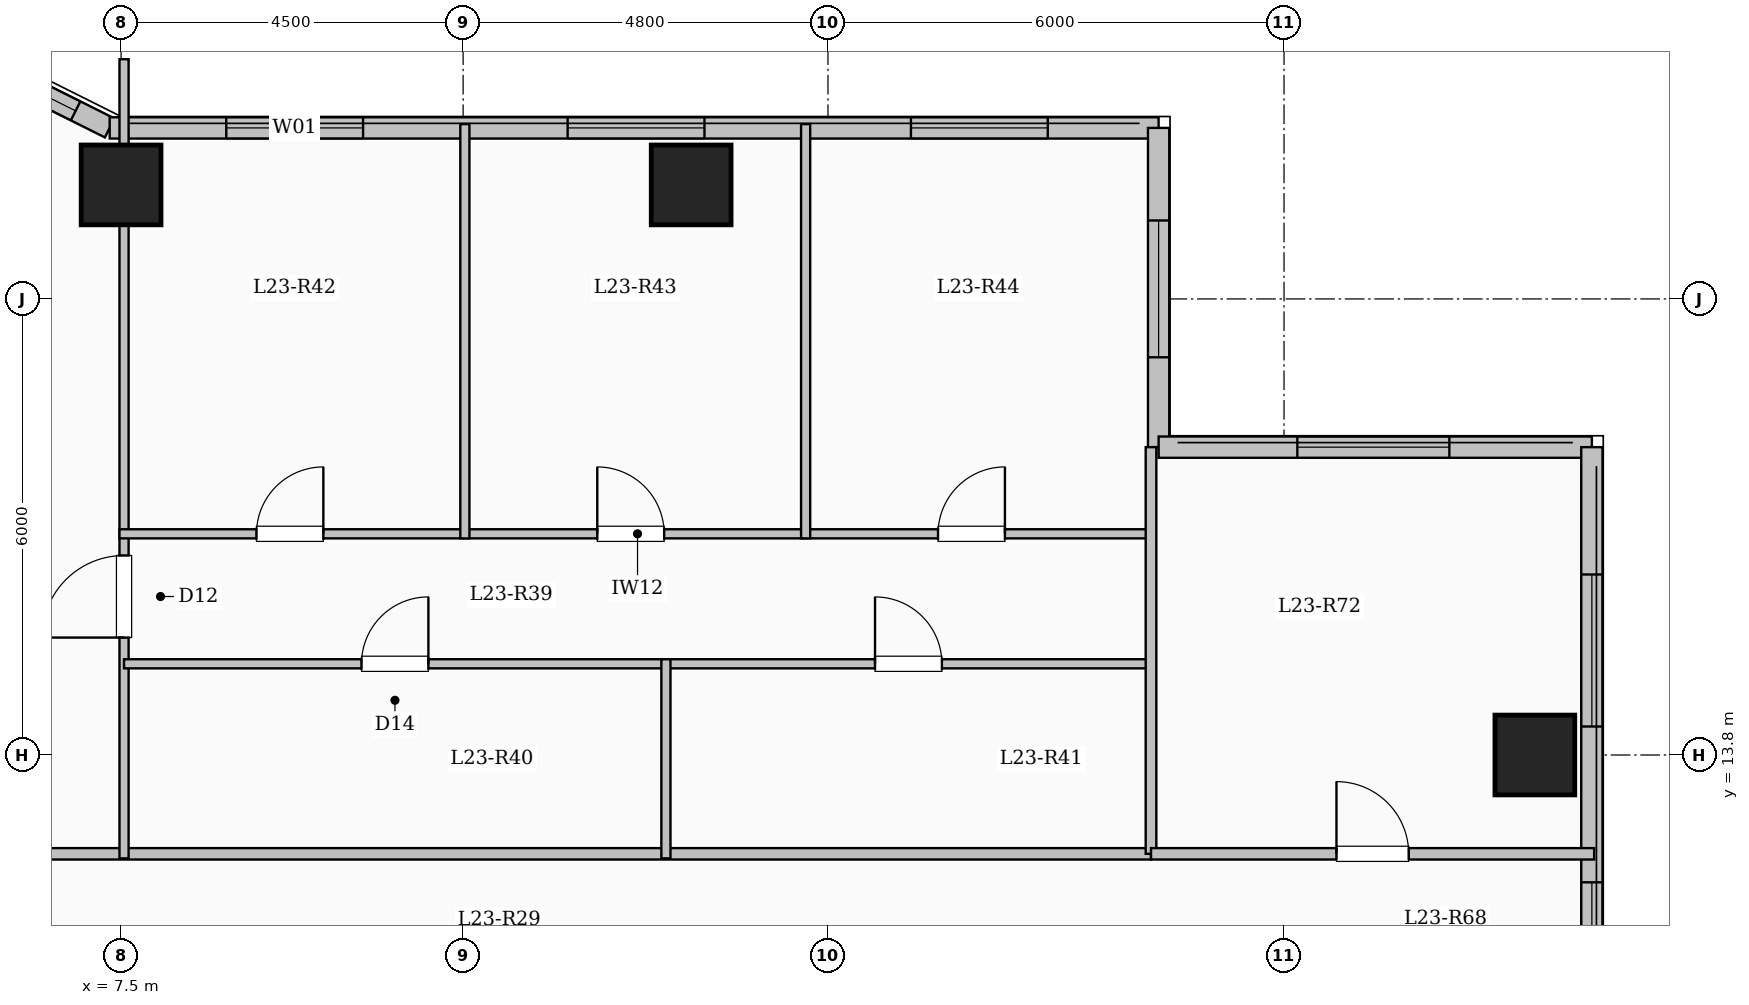
"""IFC4 building model, lengths in metres.
Left out: names, types, materials, properties, quantities, classifications, styles, units other than length and angle.
Written with IfcOpenShell. Run it as: python <this file> out.ifc"""

import sys

from ifc_helpers import new_model, si_unit, direction, frame, frame_2d, origin, origin_2d, place, context, subcontext, project, spatial, rectangle, extrude, element, fill, save


model = new_model("IFC4")
c1 = context("Model", 3, precision=1e-05, world=origin(), true_north=direction((0.0, 1.0)))
c2 = subcontext(c1, "Body", "Model", "MODEL_VIEW")
j1 = project(units=[si_unit("LENGTHUNIT", "METRE"), si_unit("PLANEANGLEUNIT", "RADIAN")], contexts=[c1])
p1 = place(None, origin())
s1 = spatial("IfcSite", under=j1, at=p1, CompositionType="ELEMENT")
p2 = place(p1, origin())
s2 = spatial("IfcBuilding", under=s1, at=p2, CompositionType="ELEMENT")
p3 = place(p2, frame((0.0, 0.0, 88.35)))
s3 = spatial("IfcBuildingStorey", under=s2, at=p3, CompositionType="ELEMENT", Elevation=88.35)
for number, where, z_axis, x_axis in (
    (1, (7.5, 21.3, 0.0), (0.0, 0.0, 1.0), (1.0, 0.0, 0.0)),
    (2, (15.0, 21.3, 0.0), (0.0, 0.0, 1.0), (1.0, 0.0, 0.0)),
    (3, (26.1, 13.8, 0.0), (0.0, 0.0, 1.0), (1.0, 0.0, 0.0)),
):
    element("IfcColumn", number, at=place(p3, frame(where, z_axis=z_axis, x_axis=x_axis)), inside=s3, PredefinedType="COLUMN", context=c2, shape_type="SweptSolid", body=[
        extrude(rectangle(XDim=1.05, YDim=1.05, at=origin_2d()), origin(), (0.0, 0.0, 1.0), 3.35),
    ])
p4 = place(p3, frame((4.35, 23.55, 0.0), z_axis=(0.0, 0.0, 1.0), x_axis=(0.894427191, -0.4472135955, 0.0)))
e4 = element("IfcWall", 4, at=p4, inside=s3, PredefinedType="SOLIDWALL", context=c2, shape_type="SweptSolid", body=[
    extrude(rectangle(XDim=3.354, YDim=0.28, at=frame_2d((1.677, 0.0))), origin(), (0.0, 0.0, 1.0), 3.1),
])
p5 = place(p4, frame((1.653, 0.0, 0.95)))
e5 = element("IfcOpeningElement", 5, at=p5, cuts=e4, PredefinedType="OPENING", context=c2, shape_type="SweptSolid", body=[
    extrude(rectangle(XDim=1.2, YDim=1.5, at=frame_2d((0.6, 0.75))), frame((0.0, 0.15, 0.0), z_axis=(0.0, -1.0, 0.0), x_axis=(1.0, 0.0, 0.0)), (0.0, 0.0, 1.0), 0.3),
])
p6 = place(p3, frame((7.35, 22.05, 0.0), z_axis=(0.0, 0.0, 1.0), x_axis=(1.0, 0.0, 0.0)))
e6 = element("IfcWall", 6, at=p6, inside=s3, PredefinedType="SOLIDWALL", context=c2, shape_type="SweptSolid", body=[
    extrude(rectangle(XDim=13.8, YDim=0.28, at=frame_2d((6.9, 0.0))), origin(), (0.0, 0.0, 1.0), 3.1),
])
p7 = place(p6, frame((1.534, 0.0, 0.9)))
e7 = element("IfcOpeningElement", 7, at=p7, cuts=e6, PredefinedType="OPENING", context=c2, shape_type="SweptSolid", body=[
    extrude(rectangle(XDim=1.8, YDim=1.65, at=frame_2d((0.9, 0.825))), frame((0.0, 0.15, 0.0), z_axis=(0.0, -1.0, 0.0), x_axis=(1.0, 0.0, 0.0)), (0.0, 0.0, 1.0), 0.3),
])
p8 = place(p6, frame((6.025, 0.0, 0.9)))
e8 = element("IfcOpeningElement", 8, at=p8, cuts=e6, PredefinedType="OPENING", context=c2, shape_type="SweptSolid", body=[
    extrude(rectangle(XDim=1.8, YDim=1.65, at=frame_2d((0.9, 0.825))), frame((0.0, 0.15, 0.0), z_axis=(0.0, -1.0, 0.0), x_axis=(1.0, 0.0, 0.0)), (0.0, 0.0, 1.0), 0.3),
])
p9 = place(p6, frame((10.542, 0.0, 0.9)))
e9 = element("IfcOpeningElement", 9, at=p9, cuts=e6, PredefinedType="OPENING", context=c2, shape_type="SweptSolid", body=[
    extrude(rectangle(XDim=1.8, YDim=1.65, at=frame_2d((0.9, 0.825))), frame((0.0, 0.15, 0.0), z_axis=(0.0, -1.0, 0.0), x_axis=(1.0, 0.0, 0.0)), (0.0, 0.0, 1.0), 0.3),
])
p10 = place(p3, frame((21.15, 22.05, 0.0), z_axis=(0.0, 0.0, 1.0), x_axis=(0.0, -1.0, 0.0)))
e10 = element("IfcWall", 10, at=p10, inside=s3, PredefinedType="SOLIDWALL", context=c2, shape_type="SweptSolid", body=[
    extrude(rectangle(XDim=4.2, YDim=0.28, at=frame_2d((2.1, 0.0))), origin(), (0.0, 0.0, 1.0), 3.1),
])
p11 = place(p10, frame((1.218, 0.0, 0.9)))
e11 = element("IfcOpeningElement", 11, at=p11, cuts=e10, PredefinedType="OPENING", context=c2, shape_type="SweptSolid", body=[
    extrude(rectangle(XDim=1.8, YDim=1.65, at=frame_2d((0.9, 0.825))), frame((0.0, 0.15, 0.0), z_axis=(0.0, -1.0, 0.0), x_axis=(1.0, 0.0, 0.0)), (0.0, 0.0, 1.0), 0.3),
])
p12 = place(p3, frame((21.15, 17.85, 0.0), z_axis=(0.0, 0.0, 1.0), x_axis=(1.0, 0.0, 0.0)))
e12 = element("IfcWall", 12, at=p12, inside=s3, PredefinedType="SOLIDWALL", context=c2, shape_type="SweptSolid", body=[
    extrude(rectangle(XDim=5.7, YDim=0.28, at=frame_2d((2.85, 0.0))), origin(), (0.0, 0.0, 1.0), 3.1),
])
p13 = place(p12, frame((1.825, 0.0, 0.9)))
e13 = element("IfcOpeningElement", 13, at=p13, cuts=e12, PredefinedType="OPENING", context=c2, shape_type="SweptSolid", body=[
    extrude(rectangle(XDim=2.0, YDim=1.7, at=frame_2d((1.0, 0.85))), frame((0.0, 0.15, 0.0), z_axis=(0.0, -1.0, 0.0), x_axis=(1.0, 0.0, 0.0)), (0.0, 0.0, 1.0), 0.3),
])
p14 = place(p3, frame((26.85, 17.85, 0.0), z_axis=(0.0, 0.0, 1.0), x_axis=(0.0, -1.0, 0.0)))
e14 = element("IfcWall", 14, at=p14, inside=s3, PredefinedType="SOLIDWALL", context=c2, shape_type="SweptSolid", body=[
    extrude(rectangle(XDim=35.7, YDim=0.28, at=frame_2d((17.85, 0.0))), origin(), (0.0, 0.0, 1.0), 3.1),
])
p15 = place(p14, frame((1.675, 0.0, 0.9)))
e15 = element("IfcOpeningElement", 15, at=p15, cuts=e14, PredefinedType="OPENING", context=c2, shape_type="SweptSolid", body=[
    extrude(rectangle(XDim=2.0, YDim=1.7, at=frame_2d((1.0, 0.85))), frame((0.0, 0.15, 0.0), z_axis=(0.0, -1.0, 0.0), x_axis=(1.0, 0.0, 0.0)), (0.0, 0.0, 1.0), 0.3),
])
p16 = place(p14, frame((5.725, 0.0, 0.95)))
e16 = element("IfcOpeningElement", 16, at=p16, cuts=e14, PredefinedType="OPENING", context=c2, shape_type="SweptSolid", body=[
    extrude(rectangle(XDim=1.0, YDim=1.5, at=frame_2d((0.5, 0.75))), frame((0.0, 0.15, 0.0), z_axis=(0.0, -1.0, 0.0), x_axis=(1.0, 0.0, 0.0)), (0.0, 0.0, 1.0), 0.3),
])
p17 = place(p14, frame((15.1, 0.0, 0.9)))
e17 = element("IfcOpeningElement", 17, at=p17, cuts=e14, PredefinedType="OPENING", context=c2, shape_type="SweptSolid", body=[
    extrude(rectangle(XDim=2.0, YDim=1.7, at=frame_2d((1.0, 0.85))), frame((0.0, 0.15, 0.0), z_axis=(0.0, -1.0, 0.0), x_axis=(1.0, 0.0, 0.0)), (0.0, 0.0, 1.0), 0.3),
])
p18 = place(p14, frame((25.857, 0.0, 0.9)))
e18 = element("IfcOpeningElement", 18, at=p18, cuts=e14, PredefinedType="OPENING", context=c2, shape_type="SweptSolid", body=[
    extrude(rectangle(XDim=1.5, YDim=1.65, at=frame_2d((0.75, 0.825))), frame((0.0, 0.15, 0.0), z_axis=(0.0, -1.0, 0.0), x_axis=(1.0, 0.0, 0.0)), (0.0, 0.0, 1.0), 0.3),
])
p19 = place(p14, frame((30.75, 0.0, 0.9)))
e19 = element("IfcOpeningElement", 19, at=p19, cuts=e14, PredefinedType="OPENING", context=c2, shape_type="SweptSolid", body=[
    extrude(rectangle(XDim=2.4, YDim=1.8, at=frame_2d((1.2, 0.9))), frame((0.0, 0.15, 0.0), z_axis=(0.0, -1.0, 0.0), x_axis=(1.0, 0.0, 0.0)), (0.0, 0.0, 1.0), 0.3),
])
p20 = place(p3, frame((3.85, 12.5, 0.0), z_axis=(0.0, 0.0, 1.0), x_axis=(1.0, 0.0, 0.0)))
e20 = element("IfcWall", 20, at=p20, inside=s3, PredefinedType="PARTITIONING", context=c2, shape_type="SweptSolid", body=[
    extrude(rectangle(XDim=17.2, YDim=0.15, at=frame_2d((8.6, 0.0))), origin(), (0.0, 0.0, 1.0), 3.1),
])
p21 = place(p20, frame((0.7, 0.0, 0.0)))
e21 = element("IfcOpeningElement", 21, at=p21, cuts=e20, PredefinedType="OPENING", context=c2, shape_type="SweptSolid", body=[
    extrude(rectangle(XDim=0.96, YDim=2.15, at=frame_2d((0.48, 1.075))), frame((0.0, 0.085, 0.0), z_axis=(0.0, -1.0, 0.0), x_axis=(1.0, 0.0, 0.0)), (0.0, 0.0, 1.0), 0.17),
])
p22 = place(p3, frame((7.539, 12.44, 0.0), z_axis=(0.0, 0.0, 1.0), x_axis=(0.0, 1.0, 0.0)))
e22 = element("IfcWall", 22, at=p22, inside=s3, PredefinedType="PARTITIONING", context=c2, shape_type="SweptSolid", body=[
    extrude(rectangle(XDim=10.514, YDim=0.12, at=frame_2d((5.257, 0.0))), origin(), (0.0, 0.0, 1.0), 2.435),
])
p23 = place(p22, frame((2.905, 0.0, 0.0)))
e23 = element("IfcOpeningElement", 23, at=p23, cuts=e22, PredefinedType="OPENING", context=c2, shape_type="SweptSolid", body=[
    extrude(rectangle(XDim=1.08, YDim=2.15, at=frame_2d((0.54, 1.075))), frame((0.0, 0.07, 0.0), z_axis=(0.0, -1.0, 0.0), x_axis=(1.0, 0.0, 0.0)), (0.0, 0.0, 1.0), 0.14),
])
p24 = place(p3, frame((7.539, 15.0, 0.0), z_axis=(0.0, 0.0, 1.0), x_axis=(1.0, 0.0, 0.0)))
e24 = element("IfcWall", 24, at=p24, inside=s3, PredefinedType="PARTITIONING", context=c2, shape_type="SweptSolid", body=[
    extrude(rectangle(XDim=7.129, YDim=0.12, at=frame_2d((3.564, 0.0))), origin(), (0.0, 0.0, 1.0), 3.1),
])
p25 = place(p24, frame((3.124, 0.0, 0.0)))
e25 = element("IfcOpeningElement", 25, at=p25, cuts=e24, PredefinedType="OPENING", context=c2, shape_type="SweptSolid", body=[
    extrude(rectangle(XDim=0.88, YDim=2.1, at=frame_2d((0.44, 1.05))), frame((0.0, 0.07, 0.0), z_axis=(0.0, -1.0, 0.0), x_axis=(1.0, 0.0, 0.0)), (0.0, 0.0, 1.0), 0.14),
])
p26 = place(p3, frame((14.668, 15.0, 0.0), z_axis=(0.0, 0.0, 1.0), x_axis=(1.0, 0.0, 0.0)))
e26 = element("IfcWall", 26, at=p26, inside=s3, PredefinedType="PARTITIONING", context=c2, shape_type="SweptSolid", body=[
    extrude(rectangle(XDim=6.382, YDim=0.12, at=frame_2d((3.191, 0.0))), origin(), (0.0, 0.0, 1.0), 3.1),
])
p27 = place(p26, frame((2.751, 0.0, 0.0)))
e27 = element("IfcOpeningElement", 27, at=p27, cuts=e26, PredefinedType="OPENING", context=c2, shape_type="SweptSolid", body=[
    extrude(rectangle(XDim=0.88, YDim=2.1, at=frame_2d((0.44, 1.05))), frame((0.0, 0.07, 0.0), z_axis=(0.0, -1.0, 0.0), x_axis=(1.0, 0.0, 0.0)), (0.0, 0.0, 1.0), 0.14),
])
p28 = place(p3, frame((7.479, 16.71, 0.0), z_axis=(0.0, 0.0, 1.0), x_axis=(1.0, 0.0, 0.0)))
e28 = element("IfcWall", 28, at=p28, inside=s3, PredefinedType="PARTITIONING", context=c2, shape_type="SweptSolid", body=[
    extrude(rectangle(XDim=13.631, YDim=0.12, at=frame_2d((6.815, 0.0))), origin(), (0.0, 0.0, 1.0), 3.1),
])
p29 = place(p28, frame((1.802, 0.0, 0.0)))
e29 = element("IfcOpeningElement", 29, at=p29, cuts=e28, PredefinedType="OPENING", context=c2, shape_type="SweptSolid", body=[
    extrude(rectangle(XDim=0.88, YDim=2.1, at=frame_2d((0.44, 1.05))), frame((0.0, 0.07, 0.0), z_axis=(0.0, -1.0, 0.0), x_axis=(1.0, 0.0, 0.0)), (0.0, 0.0, 1.0), 0.14),
])
p30 = place(p28, frame((6.286, 0.0, 0.0)))
e30 = element("IfcOpeningElement", 30, at=p30, cuts=e28, PredefinedType="OPENING", context=c2, shape_type="SweptSolid", body=[
    extrude(rectangle(XDim=0.88, YDim=2.1, at=frame_2d((0.44, 1.05))), frame((0.0, 0.07, 0.0), z_axis=(0.0, -1.0, 0.0), x_axis=(1.0, 0.0, 0.0)), (0.0, 0.0, 1.0), 0.14),
])
p31 = place(p28, frame((10.769, 0.0, 0.0)))
e31 = element("IfcOpeningElement", 31, at=p31, cuts=e28, PredefinedType="OPENING", context=c2, shape_type="SweptSolid", body=[
    extrude(rectangle(XDim=0.88, YDim=2.1, at=frame_2d((0.44, 1.05))), frame((0.0, 0.07, 0.0), z_axis=(0.0, -1.0, 0.0), x_axis=(1.0, 0.0, 0.0)), (0.0, 0.0, 1.0), 0.14),
])
p32 = place(p3, frame((14.668, 12.44, 0.0), z_axis=(0.0, 0.0, 1.0), x_axis=(0.0, 1.0, 0.0)))
e32 = element("IfcWall", 32, at=p32, inside=s3, PredefinedType="PARTITIONING", context=c2, shape_type="SweptSolid", body=[
    extrude(rectangle(XDim=2.62, YDim=0.12, at=frame_2d((1.31, 0.0))), origin(), (0.0, 0.0, 1.0), 3.1),
])
for number, where, z_axis, x_axis in (
    (33, (12.023, 16.65, 0.0), (0.0, 0.0, 1.0), (0.0, 1.0, 0.0)),
    (34, (16.506, 16.65, 0.0), (0.0, 0.0, 1.0), (0.0, 1.0, 0.0)),
):
    element("IfcWall", number, at=place(p3, frame(where, z_axis=z_axis, x_axis=x_axis)), inside=s3, PredefinedType="PARTITIONING", context=c2, shape_type="SweptSolid", body=[
        extrude(rectangle(XDim=5.45, YDim=0.12, at=frame_2d((2.725, 0.0))), origin(), (0.0, 0.0, 1.0), 3.1),
    ])
p33 = place(p3, frame((21.05, 12.5, 0.0), z_axis=(0.0, 0.0, 1.0), x_axis=(0.0, 1.0, 0.0)))
e35 = element("IfcWall", 35, at=p33, inside=s3, PredefinedType="PARTITIONING", context=c2, shape_type="SweptSolid", body=[
    extrude(rectangle(XDim=5.35, YDim=0.14, at=frame_2d((2.675, 0.0))), origin(), (0.0, 0.0, 1.0), 3.1),
])
p34 = place(p3, frame((21.05, 12.5, 0.0), z_axis=(0.0, 0.0, 1.0), x_axis=(1.0, 0.0, 0.0)))
e36 = element("IfcWall", 36, at=p34, inside=s3, PredefinedType="PARTITIONING", context=c2, shape_type="SweptSolid", body=[
    extrude(rectangle(XDim=5.83, YDim=0.15, at=frame_2d((2.915, 0.0))), origin(), (0.0, 0.0, 1.0), 3.1),
])
p35 = place(p34, frame((2.44, 0.0, 0.0)))
e37 = element("IfcOpeningElement", 37, at=p35, cuts=e36, PredefinedType="OPENING", context=c2, shape_type="SweptSolid", body=[
    extrude(rectangle(XDim=0.95, YDim=2.15, at=frame_2d((0.475, 1.075))), frame((0.0, 0.085, 0.0), z_axis=(0.0, -1.0, 0.0), x_axis=(1.0, 0.0, 0.0)), (0.0, 0.0, 1.0), 0.17),
])
p36 = place(p5, origin())
e38 = element("IfcWindow", 38, at=p36, inside=s3, PartitioningType="SINGLE_PANEL", PredefinedType="WINDOW", context=c2, shape_type="SweptSolid", body=[
    extrude(rectangle(XDim=1.2, YDim=1.5, at=frame_2d((0.6, 0.75))), frame((0.0, 0.03, 0.0), z_axis=(0.0, -1.0, 0.0), x_axis=(1.0, 0.0, 0.0)), (0.0, 0.0, 1.0), 0.06),
])
fill(e5, e38)
p37 = place(p7, origin())
e39 = element("IfcWindow", 39, at=p37, inside=s3, PartitioningType="SINGLE_PANEL", PredefinedType="WINDOW", context=c2, shape_type="SweptSolid", body=[
    extrude(rectangle(XDim=1.8, YDim=1.65, at=frame_2d((0.9, 0.825))), frame((0.0, 0.03, 0.0), z_axis=(0.0, -1.0, 0.0), x_axis=(1.0, 0.0, 0.0)), (0.0, 0.0, 1.0), 0.06),
])
fill(e7, e39)
p38 = place(p8, origin())
e40 = element("IfcWindow", 40, at=p38, inside=s3, PartitioningType="SINGLE_PANEL", PredefinedType="WINDOW", context=c2, shape_type="SweptSolid", body=[
    extrude(rectangle(XDim=1.8, YDim=1.65, at=frame_2d((0.9, 0.825))), frame((0.0, 0.03, 0.0), z_axis=(0.0, -1.0, 0.0), x_axis=(1.0, 0.0, 0.0)), (0.0, 0.0, 1.0), 0.06),
])
fill(e8, e40)
p39 = place(p9, origin())
e41 = element("IfcWindow", 41, at=p39, inside=s3, PartitioningType="SINGLE_PANEL", PredefinedType="WINDOW", context=c2, shape_type="SweptSolid", body=[
    extrude(rectangle(XDim=1.8, YDim=1.65, at=frame_2d((0.9, 0.825))), frame((0.0, 0.03, 0.0), z_axis=(0.0, -1.0, 0.0), x_axis=(1.0, 0.0, 0.0)), (0.0, 0.0, 1.0), 0.06),
])
fill(e9, e41)
p40 = place(p11, origin())
e42 = element("IfcWindow", 42, at=p40, inside=s3, PartitioningType="SINGLE_PANEL", PredefinedType="WINDOW", context=c2, shape_type="SweptSolid", body=[
    extrude(rectangle(XDim=1.8, YDim=1.65, at=frame_2d((0.9, 0.825))), frame((0.0, 0.03, 0.0), z_axis=(0.0, -1.0, 0.0), x_axis=(1.0, 0.0, 0.0)), (0.0, 0.0, 1.0), 0.06),
])
fill(e11, e42)
p41 = place(p13, origin())
e43 = element("IfcWindow", 43, at=p41, inside=s3, PartitioningType="SINGLE_PANEL", PredefinedType="WINDOW", context=c2, shape_type="SweptSolid", body=[
    extrude(rectangle(XDim=2.0, YDim=1.7, at=frame_2d((1.0, 0.85))), frame((0.0, 0.03, 0.0), z_axis=(0.0, -1.0, 0.0), x_axis=(1.0, 0.0, 0.0)), (0.0, 0.0, 1.0), 0.06),
])
fill(e13, e43)
p42 = place(p15, origin())
e44 = element("IfcWindow", 44, at=p42, inside=s3, PartitioningType="SINGLE_PANEL", PredefinedType="WINDOW", context=c2, shape_type="SweptSolid", body=[
    extrude(rectangle(XDim=2.0, YDim=1.7, at=frame_2d((1.0, 0.85))), frame((0.0, 0.03, 0.0), z_axis=(0.0, -1.0, 0.0), x_axis=(1.0, 0.0, 0.0)), (0.0, 0.0, 1.0), 0.06),
])
fill(e15, e44)
p43 = place(p16, origin())
e45 = element("IfcWindow", 45, at=p43, inside=s3, PartitioningType="SINGLE_PANEL", PredefinedType="WINDOW", context=c2, shape_type="SweptSolid", body=[
    extrude(rectangle(XDim=1.0, YDim=1.5, at=frame_2d((0.5, 0.75))), frame((0.0, 0.03, 0.0), z_axis=(0.0, -1.0, 0.0), x_axis=(1.0, 0.0, 0.0)), (0.0, 0.0, 1.0), 0.06),
])
fill(e16, e45)
p44 = place(p23, origin())
e46 = element("IfcDoor", 46, at=p44, inside=s3, OperationType="SINGLE_SWING_LEFT", PredefinedType="DOOR", context=c2, shape_type="SweptSolid", body=[
    extrude(rectangle(XDim=1.08, YDim=2.15, at=frame_2d((0.54, 1.075))), frame((0.0, 0.025, 0.0), z_axis=(0.0, -1.0, 0.0), x_axis=(1.0, 0.0, 0.0)), (0.0, 0.0, 1.0), 0.05),
])
fill(e23, e46)
p45 = place(p25, origin())
e47 = element("IfcDoor", 47, at=p45, inside=s3, OperationType="SINGLE_SWING_RIGHT", PredefinedType="DOOR", context=c2, shape_type="SweptSolid", body=[
    extrude(rectangle(XDim=0.88, YDim=2.1, at=frame_2d((0.44, 1.05))), frame((0.0, 0.025, 0.0), z_axis=(0.0, -1.0, 0.0), x_axis=(1.0, 0.0, 0.0)), (0.0, 0.0, 1.0), 0.05),
])
fill(e25, e47)
p46 = place(p27, origin())
e48 = element("IfcDoor", 48, at=p46, inside=s3, OperationType="SINGLE_SWING_LEFT", PredefinedType="DOOR", context=c2, shape_type="SweptSolid", body=[
    extrude(rectangle(XDim=0.88, YDim=2.1, at=frame_2d((0.44, 1.05))), frame((0.0, 0.025, 0.0), z_axis=(0.0, -1.0, 0.0), x_axis=(1.0, 0.0, 0.0)), (0.0, 0.0, 1.0), 0.05),
])
fill(e27, e48)
p47 = place(p29, origin())
e49 = element("IfcDoor", 49, at=p47, inside=s3, OperationType="SINGLE_SWING_RIGHT", PredefinedType="DOOR", context=c2, shape_type="SweptSolid", body=[
    extrude(rectangle(XDim=0.88, YDim=2.1, at=frame_2d((0.44, 1.05))), frame((0.0, 0.025, 0.0), z_axis=(0.0, -1.0, 0.0), x_axis=(1.0, 0.0, 0.0)), (0.0, 0.0, 1.0), 0.05),
])
fill(e29, e49)
p48 = place(p30, origin())
e50 = element("IfcDoor", 50, at=p48, inside=s3, OperationType="SINGLE_SWING_LEFT", PredefinedType="DOOR", context=c2, shape_type="SweptSolid", body=[
    extrude(rectangle(XDim=0.88, YDim=2.1, at=frame_2d((0.44, 1.05))), frame((0.0, 0.025, 0.0), z_axis=(0.0, -1.0, 0.0), x_axis=(1.0, 0.0, 0.0)), (0.0, 0.0, 1.0), 0.05),
])
fill(e30, e50)
p49 = place(p31, origin())
e51 = element("IfcDoor", 51, at=p49, inside=s3, OperationType="SINGLE_SWING_RIGHT", PredefinedType="DOOR", context=c2, shape_type="SweptSolid", body=[
    extrude(rectangle(XDim=0.88, YDim=2.1, at=frame_2d((0.44, 1.05))), frame((0.0, 0.025, 0.0), z_axis=(0.0, -1.0, 0.0), x_axis=(1.0, 0.0, 0.0)), (0.0, 0.0, 1.0), 0.05),
])
fill(e31, e51)
p50 = place(p35, origin())
e52 = element("IfcDoor", 52, at=p50, inside=s3, OperationType="SINGLE_SWING_LEFT", PredefinedType="DOOR", context=c2, shape_type="SweptSolid", body=[
    extrude(rectangle(XDim=0.95, YDim=2.15, at=frame_2d((0.475, 1.075))), frame((0.0, 0.025, 0.0), z_axis=(0.0, -1.0, 0.0), x_axis=(1.0, 0.0, 0.0)), (0.0, 0.0, 1.0), 0.05),
])
fill(e37, e52)
save(model, sys.argv[1])
